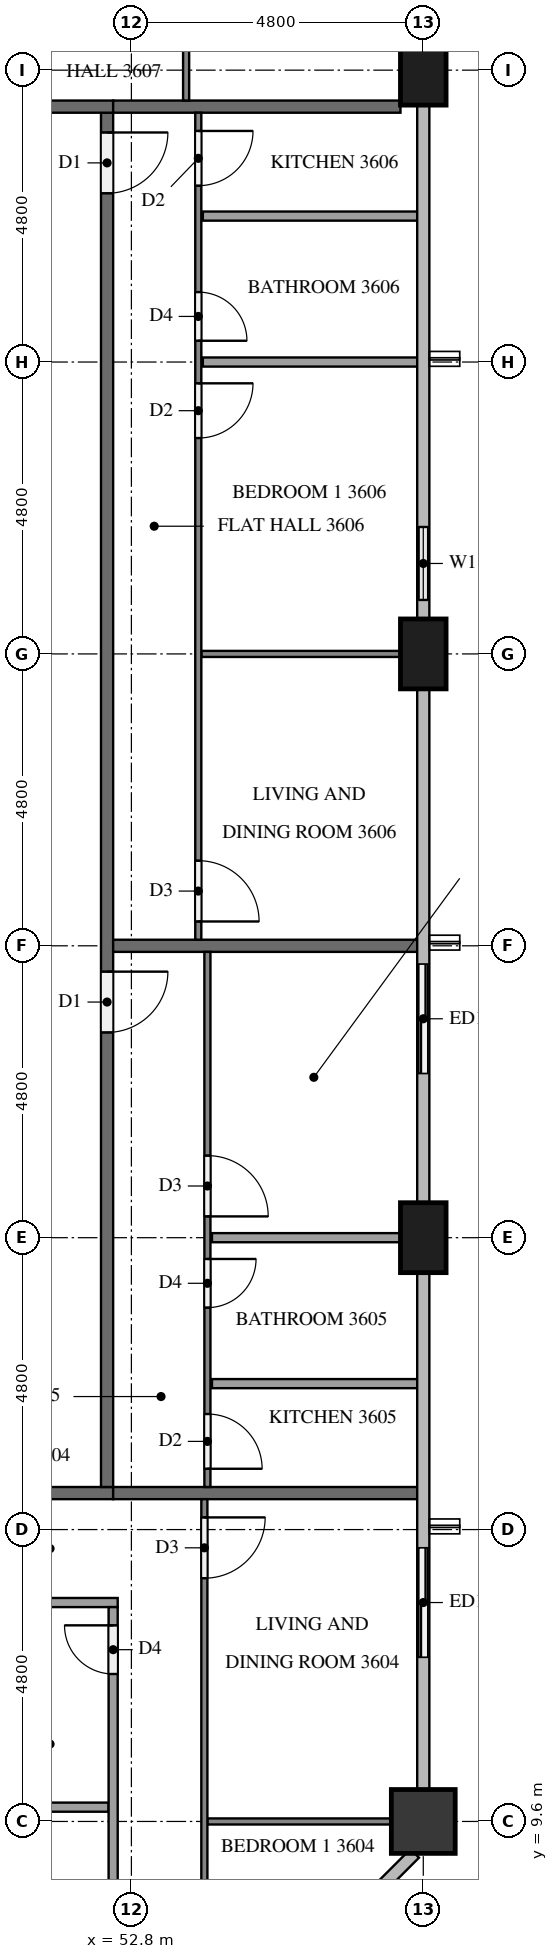
"""IFC4 building model, lengths in metres.
Left out: names, types, materials, properties, quantities, classifications, styles, units other than length and angle.
Written with IfcOpenShell. Run it as: python <this file> out.ifc"""

import sys

from ifc_helpers import new_model, si_unit, direction, frame, frame_2d, origin, origin_2d, place, context, subcontext, project, spatial, rectangle, extrude, element, fill, save


model = new_model("IFC4")
c1 = context("Model", 3, precision=1e-05, world=origin(), true_north=direction((0.0, 1.0)))
c2 = subcontext(c1, "Body", "Model", "MODEL_VIEW")
j1 = project(units=[si_unit("LENGTHUNIT", "METRE"), si_unit("PLANEANGLEUNIT", "RADIAN")], contexts=[c1])
p1 = place(None, origin())
s1 = spatial("IfcSite", under=j1, at=p1, CompositionType="ELEMENT")
p2 = place(p1, origin())
s2 = spatial("IfcBuilding", under=s1, at=p2, CompositionType="ELEMENT")
p3 = place(p2, frame((0.0, 0.0, 140.1)))
s3 = spatial("IfcBuildingStorey", under=s2, at=p3, CompositionType="ELEMENT", Elevation=140.1)
p4 = place(p3, frame((57.6, 9.6, 0.0), z_axis=(0.0, 0.0, 1.0), x_axis=(1.0, 0.0, 0.0)))
e1 = element("IfcColumn", 1, at=p4, inside=s3, PredefinedType="COLUMN", context=c2, shape_type="SweptSolid", body=[
    extrude(rectangle(XDim=1.05, YDim=1.05, at=origin_2d()), origin(), (0.0, 0.0, 1.0), 3.1),
])
for number, where, z_axis, x_axis in (
    (2, (57.6, 19.2, 0.0), (0.0, 0.0, 1.0), (0.0, 1.0, 0.0)),
    (3, (57.6, 28.8, 0.0), (0.0, 0.0, 1.0), (0.0, 1.0, 0.0)),
    (4, (57.6, 38.4, 0.0), (0.0, 0.0, 1.0), (0.0, 1.0, 0.0)),
):
    element("IfcColumn", number, at=place(p3, frame(where, z_axis=z_axis, x_axis=x_axis)), inside=s3, PredefinedType="COLUMN", context=c2, shape_type="SweptSolid", body=[
        extrude(rectangle(XDim=1.15, YDim=0.75, at=origin_2d()), origin(), (0.0, 0.0, 1.0), 3.1),
    ])
p5 = place(p3, frame((57.6, 12.0, 0.0), z_axis=(0.0, 0.0, 1.0), x_axis=(0.0, 1.0, 0.0)))
e5 = element("IfcWall", 5, at=p5, inside=s3, PredefinedType="SOLIDWALL", context=c2, shape_type="SweptSolid", body=[
    extrude(rectangle(XDim=2.4, YDim=0.15, at=frame_2d((1.2, 0.0))), origin(), (0.0, 0.0, 1.0), 3.1),
])
p6 = place(p5, frame((0.3, 0.0, 0.0)))
e6 = element("IfcOpeningElement", 6, at=p6, cuts=e5, PredefinedType="OPENING", context=c2, shape_type="SweptSolid", body=[
    extrude(rectangle(XDim=1.8, YDim=2.4, at=frame_2d((0.9, 1.2))), frame((0.0, 0.085, 0.0), z_axis=(0.0, -1.0, 0.0), x_axis=(1.0, 0.0, 0.0)), (0.0, 0.0, 1.0), 0.17),
])
p7 = place(p3, frame((57.6, 21.6, 0.0), z_axis=(0.0, 0.0, 1.0), x_axis=(0.0, 1.0, 0.0)))
e7 = element("IfcWall", 7, at=p7, inside=s3, PredefinedType="SOLIDWALL", context=c2, shape_type="SweptSolid", body=[
    extrude(rectangle(XDim=2.4, YDim=0.15, at=frame_2d((1.2, 0.0))), origin(), (0.0, 0.0, 1.0), 3.1),
])
p8 = place(p7, frame((0.3, 0.0, 0.0)))
e8 = element("IfcOpeningElement", 8, at=p8, cuts=e7, PredefinedType="OPENING", context=c2, shape_type="SweptSolid", body=[
    extrude(rectangle(XDim=1.8, YDim=2.4, at=frame_2d((0.9, 1.2))), frame((0.0, 0.085, 0.0), z_axis=(0.0, -1.0, 0.0), x_axis=(1.0, 0.0, 0.0)), (0.0, 0.0, 1.0), 0.17),
])
p9 = place(p3, frame((57.6, 29.375, 0.0), z_axis=(0.0, 0.0, 1.0), x_axis=(0.0, 1.0, 0.0)))
e9 = element("IfcWall", 9, at=p9, inside=s3, PredefinedType="SOLIDWALL", context=c2, shape_type="SweptSolid", body=[
    extrude(rectangle(XDim=1.825, YDim=0.15, at=frame_2d((0.913, 0.0))), origin(), (0.0, 0.0, 1.0), 3.1),
])
p10 = place(p9, frame((0.312, 0.0, 0.9)))
e10 = element("IfcOpeningElement", 10, at=p10, cuts=e9, PredefinedType="OPENING", context=c2, shape_type="SweptSolid", body=[
    extrude(rectangle(XDim=1.2, YDim=1.4, at=frame_2d((0.6, 0.7))), frame((0.0, 0.085, 0.0), z_axis=(0.0, -1.0, 0.0), x_axis=(1.0, 0.0, 0.0)), (0.0, 0.0, 1.0), 0.17),
])
p11 = place(p3, frame((50.3, 15.0, 0.0), z_axis=(0.0, 0.0, 1.0), x_axis=(1.0, 0.0, 0.0)))
e11 = element("IfcWall", 11, at=p11, inside=s3, PredefinedType="PARTITIONING", context=c2, shape_type="SweptSolid", body=[
    extrude(rectangle(XDim=2.2, YDim=0.2, at=frame_2d((1.1, 0.0))), origin(), (0.0, 0.0, 1.0), 3.1),
])
p12 = place(p3, frame((52.4, 37.7, 0.0), z_axis=(0.0, 0.0, 1.0), x_axis=(0.0, -1.0, 0.0)))
e12 = element("IfcWall", 12, at=p12, inside=s3, PredefinedType="PARTITIONING", context=c2, shape_type="SweptSolid", body=[
    extrude(rectangle(XDim=22.6, YDim=0.2, at=frame_2d((11.3, 0.0))), origin(), (0.0, 0.0, 1.0), 3.1),
])
p13 = place(p12, frame((14.125, 0.0, 0.0)))
e13 = element("IfcOpeningElement", 13, at=p13, cuts=e12, PredefinedType="OPENING", context=c2, shape_type="SweptSolid", body=[
    extrude(rectangle(XDim=1.0, YDim=2.1, at=frame_2d((0.5, 1.05))), frame((0.0, 0.11, 0.0), z_axis=(0.0, -1.0, 0.0), x_axis=(1.0, 0.0, 0.0)), (0.0, 0.0, 1.0), 0.22),
])
p14 = place(p12, frame((0.325, 0.0, 0.0)))
e14 = element("IfcOpeningElement", 14, at=p14, cuts=e12, PredefinedType="OPENING", context=c2, shape_type="SweptSolid", body=[
    extrude(rectangle(XDim=1.0, YDim=2.1, at=frame_2d((0.5, 1.05))), frame((0.0, 0.11, 0.0), z_axis=(0.0, -1.0, 0.0), x_axis=(1.0, 0.0, 0.0)), (0.0, 0.0, 1.0), 0.22),
])
p15 = place(p3, frame((52.5, 37.8, 0.0), z_axis=(0.0, 0.0, 1.0), x_axis=(-1.0, 0.0, 0.0)))
e15 = element("IfcWall", 15, at=p15, inside=s3, PredefinedType="PARTITIONING", context=c2, shape_type="SweptSolid", body=[
    extrude(rectangle(XDim=2.2, YDim=0.2, at=frame_2d((1.1, 0.0))), origin(), (0.0, 0.0, 1.0), 3.1),
])
for number, where, z_axis, x_axis in (
    (16, (52.5, 15.0, 0.0), (0.0, 0.0, 1.0), (1.0, 0.0, 0.0)),
    (17, (52.5, 24.0, 0.0), (0.0, 0.0, 1.0), (1.0, 0.0, 0.0)),
):
    element("IfcWall", number, at=place(p3, frame(where, z_axis=z_axis, x_axis=x_axis)), inside=s3, PredefinedType="PARTITIONING", context=c2, shape_type="SweptSolid", body=[
        extrude(rectangle(XDim=5.0, YDim=0.2, at=frame_2d((2.5, 0.0))), origin(), (0.0, 0.0, 1.0), 3.1),
    ])
p16 = place(p3, frame((52.5, 37.8, 0.0), z_axis=(0.0, 0.0, 1.0), x_axis=(1.0, 0.0, 0.0)))
e18 = element("IfcWall", 18, at=p16, inside=s3, PredefinedType="PARTITIONING", context=c2, shape_type="SweptSolid", body=[
    extrude(rectangle(XDim=4.725, YDim=0.2, at=frame_2d((2.363, 0.0))), origin(), (0.0, 0.0, 1.0), 3.1),
])
p17 = place(p3, frame((54.05, 9.6, 0.0), z_axis=(0.0, 0.0, 1.0), x_axis=(1.0, 0.0, 0.0)))
e19 = element("IfcWall", 19, at=p17, inside=s3, PredefinedType="PARTITIONING", context=c2, shape_type="SweptSolid", body=[
    extrude(rectangle(XDim=3.025, YDim=0.1, at=frame_2d((1.512, 0.0))), origin(), (0.0, 0.0, 1.0), 3.1),
])
p18 = place(p3, frame((54.0, 14.9, 0.0), z_axis=(0.0, 0.0, 1.0), x_axis=(0.0, -1.0, 0.0)))
e20 = element("IfcWall", 20, at=p18, inside=s3, PredefinedType="PARTITIONING", context=c2, shape_type="SweptSolid", body=[
    extrude(rectangle(XDim=9.678, YDim=0.1, at=frame_2d((4.839, 0.0))), origin(), (0.0, 0.0, 1.0), 3.1),
])
p19 = place(p18, frame((0.3, 0.0, 0.0)))
e21 = element("IfcOpeningElement", 21, at=p19, cuts=e20, PredefinedType="OPENING", context=c2, shape_type="SweptSolid", body=[
    extrude(rectangle(XDim=1.0, YDim=2.1, at=frame_2d((0.5, 1.05))), frame((0.0, 0.06, 0.0), z_axis=(0.0, -1.0, 0.0), x_axis=(1.0, 0.0, 0.0)), (0.0, 0.0, 1.0), 0.12),
])
p20 = place(p18, frame((8.479, 0.0, 0.0)))
e22 = element("IfcOpeningElement", 22, at=p20, cuts=e20, PredefinedType="OPENING", context=c2, shape_type="SweptSolid", body=[
    extrude(rectangle(XDim=0.9, YDim=2.1, at=frame_2d((0.45, 1.05))), frame((0.0, 0.06, 0.0), z_axis=(0.0, -1.0, 0.0), x_axis=(1.0, 0.0, 0.0)), (0.0, 0.0, 1.0), 0.12),
])
p21 = place(p3, frame((50.5, 9.835, 0.0), z_axis=(0.0, 0.0, 1.0), x_axis=(1.0, 0.0, 0.0)))
e23 = element("IfcWall", 23, at=p21, inside=s3, PredefinedType="PARTITIONING", context=c2, shape_type="SweptSolid", body=[
    extrude(rectangle(XDim=1.925, YDim=0.15, at=frame_2d((0.962, 0.0))), origin(), (0.0, 0.0, 1.0), 3.1),
])
p22 = place(p3, frame((50.5, 13.2, 0.0), z_axis=(0.0, 0.0, 1.0), x_axis=(1.0, 0.0, 0.0)))
e24 = element("IfcWall", 24, at=p22, inside=s3, PredefinedType="PARTITIONING", context=c2, shape_type="SweptSolid", body=[
    extrude(rectangle(XDim=2.075, YDim=0.15, at=frame_2d((1.038, 0.0))), origin(), (0.0, 0.0, 1.0), 3.1),
])
p23 = place(p3, frame((52.5, 5.325, 0.0), z_axis=(0.0, 0.0, 1.0), x_axis=(0.0, 1.0, 0.0)))
e25 = element("IfcWall", 25, at=p23, inside=s3, PredefinedType="PARTITIONING", context=c2, shape_type="SweptSolid", body=[
    extrude(rectangle(XDim=7.8, YDim=0.15, at=frame_2d((3.9, 0.0))), origin(), (0.0, 0.0, 1.0), 3.1),
])
p24 = place(p23, frame((6.7, 0.0, 0.0)))
e26 = element("IfcOpeningElement", 26, at=p24, cuts=e25, PredefinedType="OPENING", context=c2, shape_type="SweptSolid", body=[
    extrude(rectangle(XDim=0.8, YDim=2.1, at=frame_2d((0.4, 1.05))), frame((0.0, 0.085, 0.0), z_axis=(0.0, -1.0, 0.0), x_axis=(1.0, 0.0, 0.0)), (0.0, 0.0, 1.0), 0.17),
])
p25 = place(p23, frame((0.3, 0.0, 0.0)))
e27 = element("IfcOpeningElement", 27, at=p25, cuts=e25, PredefinedType="OPENING", context=c2, shape_type="SweptSolid", body=[
    extrude(rectangle(XDim=0.9, YDim=2.1, at=frame_2d((0.45, 1.05))), frame((0.0, 0.085, 0.0), z_axis=(0.0, -1.0, 0.0), x_axis=(1.0, 0.0, 0.0)), (0.0, 0.0, 1.0), 0.17),
])
p26 = place(p3, frame((54.125, 19.2, 0.0), z_axis=(0.0, 0.0, 1.0), x_axis=(1.0, 0.0, 0.0)))
e28 = element("IfcWall", 28, at=p26, inside=s3, PredefinedType="PARTITIONING", context=c2, shape_type="SweptSolid", body=[
    extrude(rectangle(XDim=3.1, YDim=0.15, at=frame_2d((1.55, 0.0))), origin(), (0.0, 0.0, 1.0), 3.1),
])
p27 = place(p3, frame((54.125, 16.8, 0.0), z_axis=(0.0, 0.0, 1.0), x_axis=(1.0, 0.0, 0.0)))
e29 = element("IfcWall", 29, at=p27, inside=s3, PredefinedType="PARTITIONING", context=c2, shape_type="SweptSolid", body=[
    extrude(rectangle(XDim=3.375, YDim=0.15, at=frame_2d((1.688, 0.0))), origin(), (0.0, 0.0, 1.0), 3.1),
])
p28 = place(p3, frame((54.05, 23.9, 0.0), z_axis=(0.0, 0.0, 1.0), x_axis=(0.0, -1.0, 0.0)))
e30 = element("IfcWall", 30, at=p28, inside=s3, PredefinedType="PARTITIONING", context=c2, shape_type="SweptSolid", body=[
    extrude(rectangle(XDim=8.8, YDim=0.1, at=frame_2d((4.4, 0.0))), origin(), (0.0, 0.0, 1.0), 3.1),
])
p29 = place(p28, frame((3.35, 0.0, 0.0)))
e31 = element("IfcOpeningElement", 31, at=p29, cuts=e30, PredefinedType="OPENING", context=c2, shape_type="SweptSolid", body=[
    extrude(rectangle(XDim=1.0, YDim=2.1, at=frame_2d((0.5, 1.05))), frame((0.0, 0.06, 0.0), z_axis=(0.0, -1.0, 0.0), x_axis=(1.0, 0.0, 0.0)), (0.0, 0.0, 1.0), 0.12),
])
p30 = place(p28, frame((5.05, 0.0, 0.0)))
e32 = element("IfcOpeningElement", 32, at=p30, cuts=e30, PredefinedType="OPENING", context=c2, shape_type="SweptSolid", body=[
    extrude(rectangle(XDim=0.8, YDim=2.1, at=frame_2d((0.4, 1.05))), frame((0.0, 0.06, 0.0), z_axis=(0.0, -1.0, 0.0), x_axis=(1.0, 0.0, 0.0)), (0.0, 0.0, 1.0), 0.12),
])
p31 = place(p28, frame((7.6, 0.0, 0.0)))
e33 = element("IfcOpeningElement", 33, at=p31, cuts=e30, PredefinedType="OPENING", context=c2, shape_type="SweptSolid", body=[
    extrude(rectangle(XDim=0.9, YDim=2.1, at=frame_2d((0.45, 1.05))), frame((0.0, 0.06, 0.0), z_axis=(0.0, -1.0, 0.0), x_axis=(1.0, 0.0, 0.0)), (0.0, 0.0, 1.0), 0.12),
])
for number, where, z_axis, x_axis in (
    (34, (53.975, 36.0, 0.0), (0.0, 0.0, 1.0), (1.0, 0.0, 0.0)),
    (35, (53.975, 33.6, 0.0), (0.0, 0.0, 1.0), (1.0, 0.0, 0.0)),
):
    element("IfcWall", number, at=place(p3, frame(where, z_axis=z_axis, x_axis=x_axis)), inside=s3, PredefinedType="PARTITIONING", context=c2, shape_type="SweptSolid", body=[
        extrude(rectangle(XDim=3.525, YDim=0.15, at=frame_2d((1.762, 0.0))), origin(), (0.0, 0.0, 1.0), 3.1),
    ])
p32 = place(p3, frame((53.95, 28.8, 0.0), z_axis=(0.0, 0.0, 1.0), x_axis=(1.0, 0.0, 0.0)))
e36 = element("IfcWall", 36, at=p32, inside=s3, PredefinedType="PARTITIONING", context=c2, shape_type="SweptSolid", body=[
    extrude(rectangle(XDim=3.275, YDim=0.1, at=frame_2d((1.638, 0.0))), origin(), (0.0, 0.0, 1.0), 3.1),
])
p33 = place(p3, frame((53.9, 37.7, 0.0), z_axis=(0.0, 0.0, 1.0), x_axis=(0.0, -1.0, 0.0)))
e37 = element("IfcWall", 37, at=p33, inside=s3, PredefinedType="PARTITIONING", context=c2, shape_type="SweptSolid", body=[
    extrude(rectangle(XDim=13.6, YDim=0.1, at=frame_2d((6.8, 0.0))), origin(), (0.0, 0.0, 1.0), 3.1),
])
p34 = place(p33, frame((0.3, 0.0, 0.0)))
e38 = element("IfcOpeningElement", 38, at=p34, cuts=e37, PredefinedType="OPENING", context=c2, shape_type="SweptSolid", body=[
    extrude(rectangle(XDim=0.9, YDim=2.1, at=frame_2d((0.45, 1.05))), frame((0.0, 0.06, 0.0), z_axis=(0.0, -1.0, 0.0), x_axis=(1.0, 0.0, 0.0)), (0.0, 0.0, 1.0), 0.12),
])
p35 = place(p33, frame((2.95, 0.0, 0.0)))
e39 = element("IfcOpeningElement", 39, at=p35, cuts=e37, PredefinedType="OPENING", context=c2, shape_type="SweptSolid", body=[
    extrude(rectangle(XDim=0.8, YDim=2.1, at=frame_2d((0.4, 1.05))), frame((0.0, 0.06, 0.0), z_axis=(0.0, -1.0, 0.0), x_axis=(1.0, 0.0, 0.0)), (0.0, 0.0, 1.0), 0.12),
])
p36 = place(p33, frame((4.45, 0.0, 0.0)))
e40 = element("IfcOpeningElement", 40, at=p36, cuts=e37, PredefinedType="OPENING", context=c2, shape_type="SweptSolid", body=[
    extrude(rectangle(XDim=0.9, YDim=2.1, at=frame_2d((0.45, 1.05))), frame((0.0, 0.06, 0.0), z_axis=(0.0, -1.0, 0.0), x_axis=(1.0, 0.0, 0.0)), (0.0, 0.0, 1.0), 0.12),
])
p37 = place(p33, frame((12.3, 0.0, 0.0)))
e41 = element("IfcOpeningElement", 41, at=p37, cuts=e37, PredefinedType="OPENING", context=c2, shape_type="SweptSolid", body=[
    extrude(rectangle(XDim=1.0, YDim=2.1, at=frame_2d((0.5, 1.05))), frame((0.0, 0.06, 0.0), z_axis=(0.0, -1.0, 0.0), x_axis=(1.0, 0.0, 0.0)), (0.0, 0.0, 1.0), 0.12),
])
p38 = place(p3, frame((53.7, 52.459, 0.0), z_axis=(0.0, 0.0, 1.0), x_axis=(0.0, -1.0, 0.0)))
e42 = element("IfcWall", 42, at=p38, inside=s3, PredefinedType="PARTITIONING", context=c2, shape_type="SweptSolid", body=[
    extrude(rectangle(XDim=14.559, YDim=0.1, at=frame_2d((7.279, 0.0))), origin(), (0.0, 0.0, 1.0), 3.1),
])
p39 = place(p38, frame((9.609, 0.0, 0.0)))
e43 = element("IfcOpeningElement", 43, at=p39, cuts=e42, PredefinedType="OPENING", context=c2, shape_type="SweptSolid", body=[
    extrude(rectangle(XDim=0.9, YDim=2.1, at=frame_2d((0.45, 1.05))), frame((0.0, 0.06, 0.0), z_axis=(0.0, -1.0, 0.0), x_axis=(1.0, 0.0, 0.0)), (0.0, 0.0, 1.0), 0.12),
])
p40 = place(p38, frame((7.909, 0.0, 0.0)))
e44 = element("IfcOpeningElement", 44, at=p40, cuts=e42, PredefinedType="OPENING", context=c2, shape_type="SweptSolid", body=[
    extrude(rectangle(XDim=1.0, YDim=2.1, at=frame_2d((0.5, 1.05))), frame((0.0, 0.06, 0.0), z_axis=(0.0, -1.0, 0.0), x_axis=(1.0, 0.0, 0.0)), (0.0, 0.0, 1.0), 0.12),
])
p41 = place(p38, frame((0.3, 0.0, 0.0)))
e45 = element("IfcOpeningElement", 45, at=p41, cuts=e42, PredefinedType="OPENING", context=c2, shape_type="SweptSolid", body=[
    extrude(rectangle(XDim=0.9, YDim=2.1, at=frame_2d((0.45, 1.05))), frame((0.0, 0.06, 0.0), z_axis=(0.0, -1.0, 0.0), x_axis=(1.0, 0.0, 0.0)), (0.0, 0.0, 1.0), 0.12),
])
p42 = place(p6, origin())
e46 = element("IfcDoor", 46, at=p42, inside=s3, OperationType="SLIDING_TO_RIGHT", PredefinedType="DOOR", context=c2, shape_type="SweptSolid", body=[
    extrude(rectangle(XDim=1.8, YDim=2.4, at=frame_2d((0.9, 1.2))), frame((0.0, 0.025, 0.0), z_axis=(0.0, -1.0, 0.0), x_axis=(1.0, 0.0, 0.0)), (0.0, 0.0, 1.0), 0.05),
])
fill(e6, e46)
p43 = place(p8, origin())
e47 = element("IfcDoor", 47, at=p43, inside=s3, OperationType="SLIDING_TO_LEFT", PredefinedType="DOOR", context=c2, shape_type="SweptSolid", body=[
    extrude(rectangle(XDim=1.8, YDim=2.4, at=frame_2d((0.9, 1.2))), frame((0.0, 0.025, 0.0), z_axis=(0.0, -1.0, 0.0), x_axis=(1.0, 0.0, 0.0)), (0.0, 0.0, 1.0), 0.05),
])
fill(e8, e47)
p44 = place(p10, origin())
e48 = element("IfcWindow", 48, at=p44, inside=s3, PartitioningType="SINGLE_PANEL", PredefinedType="WINDOW", context=c2, shape_type="SweptSolid", body=[
    extrude(rectangle(XDim=1.2, YDim=1.4, at=frame_2d((0.6, 0.7))), frame((0.0, 0.03, 0.0), z_axis=(0.0, -1.0, 0.0), x_axis=(1.0, 0.0, 0.0)), (0.0, 0.0, 1.0), 0.06),
])
fill(e10, e48)
p45 = place(p13, origin())
e49 = element("IfcDoor", 49, at=p45, inside=s3, OperationType="SINGLE_SWING_LEFT", PredefinedType="DOOR", context=c2, shape_type="SweptSolid", body=[
    extrude(rectangle(XDim=1.0, YDim=2.1, at=frame_2d((0.5, 1.05))), frame((0.0, 0.025, 0.0), z_axis=(0.0, -1.0, 0.0), x_axis=(1.0, 0.0, 0.0)), (0.0, 0.0, 1.0), 0.05),
])
fill(e13, e49)
p46 = place(p14, origin())
e50 = element("IfcDoor", 50, at=p46, inside=s3, OperationType="SINGLE_SWING_LEFT", PredefinedType="DOOR", context=c2, shape_type="SweptSolid", body=[
    extrude(rectangle(XDim=1.0, YDim=2.1, at=frame_2d((0.5, 1.05))), frame((0.0, 0.025, 0.0), z_axis=(0.0, -1.0, 0.0), x_axis=(1.0, 0.0, 0.0)), (0.0, 0.0, 1.0), 0.05),
])
fill(e14, e50)
p47 = place(p19, origin())
e51 = element("IfcDoor", 51, at=p47, inside=s3, OperationType="SINGLE_SWING_LEFT", PredefinedType="DOOR", context=c2, shape_type="SweptSolid", body=[
    extrude(rectangle(XDim=1.0, YDim=2.1, at=frame_2d((0.5, 1.05))), frame((0.0, 0.025, 0.0), z_axis=(0.0, -1.0, 0.0), x_axis=(1.0, 0.0, 0.0)), (0.0, 0.0, 1.0), 0.05),
])
fill(e21, e51)
p48 = place(p24, origin())
e52 = element("IfcDoor", 52, at=p48, inside=s3, OperationType="SINGLE_SWING_RIGHT", PredefinedType="DOOR", context=c2, shape_type="SweptSolid", body=[
    extrude(rectangle(XDim=0.8, YDim=2.1, at=frame_2d((0.4, 1.05))), frame((0.0, 0.025, 0.0), z_axis=(0.0, -1.0, 0.0), x_axis=(1.0, 0.0, 0.0)), (0.0, 0.0, 1.0), 0.05),
])
fill(e26, e52)
p49 = place(p29, origin())
e53 = element("IfcDoor", 53, at=p49, inside=s3, OperationType="SINGLE_SWING_RIGHT", PredefinedType="DOOR", context=c2, shape_type="SweptSolid", body=[
    extrude(rectangle(XDim=1.0, YDim=2.1, at=frame_2d((0.5, 1.05))), frame((0.0, 0.025, 0.0), z_axis=(0.0, -1.0, 0.0), x_axis=(1.0, 0.0, 0.0)), (0.0, 0.0, 1.0), 0.05),
])
fill(e31, e53)
p50 = place(p30, origin())
e54 = element("IfcDoor", 54, at=p50, inside=s3, OperationType="SINGLE_SWING_LEFT", PredefinedType="DOOR", context=c2, shape_type="SweptSolid", body=[
    extrude(rectangle(XDim=0.8, YDim=2.1, at=frame_2d((0.4, 1.05))), frame((0.0, 0.025, 0.0), z_axis=(0.0, -1.0, 0.0), x_axis=(1.0, 0.0, 0.0)), (0.0, 0.0, 1.0), 0.05),
])
fill(e32, e54)
p51 = place(p31, origin())
e55 = element("IfcDoor", 55, at=p51, inside=s3, OperationType="SINGLE_SWING_RIGHT", PredefinedType="DOOR", context=c2, shape_type="SweptSolid", body=[
    extrude(rectangle(XDim=0.9, YDim=2.1, at=frame_2d((0.45, 1.05))), frame((0.0, 0.025, 0.0), z_axis=(0.0, -1.0, 0.0), x_axis=(1.0, 0.0, 0.0)), (0.0, 0.0, 1.0), 0.05),
])
fill(e33, e55)
p52 = place(p34, origin())
e56 = element("IfcDoor", 56, at=p52, inside=s3, OperationType="SINGLE_SWING_LEFT", PredefinedType="DOOR", context=c2, shape_type="SweptSolid", body=[
    extrude(rectangle(XDim=0.9, YDim=2.1, at=frame_2d((0.45, 1.05))), frame((0.0, 0.025, 0.0), z_axis=(0.0, -1.0, 0.0), x_axis=(1.0, 0.0, 0.0)), (0.0, 0.0, 1.0), 0.05),
])
fill(e38, e56)
p53 = place(p35, origin())
e57 = element("IfcDoor", 57, at=p53, inside=s3, OperationType="SINGLE_SWING_RIGHT", PredefinedType="DOOR", context=c2, shape_type="SweptSolid", body=[
    extrude(rectangle(XDim=0.8, YDim=2.1, at=frame_2d((0.4, 1.05))), frame((0.0, 0.025, 0.0), z_axis=(0.0, -1.0, 0.0), x_axis=(1.0, 0.0, 0.0)), (0.0, 0.0, 1.0), 0.05),
])
fill(e39, e57)
p54 = place(p36, origin())
e58 = element("IfcDoor", 58, at=p54, inside=s3, OperationType="SINGLE_SWING_LEFT", PredefinedType="DOOR", context=c2, shape_type="SweptSolid", body=[
    extrude(rectangle(XDim=0.9, YDim=2.1, at=frame_2d((0.45, 1.05))), frame((0.0, 0.025, 0.0), z_axis=(0.0, -1.0, 0.0), x_axis=(1.0, 0.0, 0.0)), (0.0, 0.0, 1.0), 0.05),
])
fill(e40, e58)
p55 = place(p37, origin())
e59 = element("IfcDoor", 59, at=p55, inside=s3, OperationType="SINGLE_SWING_RIGHT", PredefinedType="DOOR", context=c2, shape_type="SweptSolid", body=[
    extrude(rectangle(XDim=1.0, YDim=2.1, at=frame_2d((0.5, 1.05))), frame((0.0, 0.025, 0.0), z_axis=(0.0, -1.0, 0.0), x_axis=(1.0, 0.0, 0.0)), (0.0, 0.0, 1.0), 0.05),
])
fill(e41, e59)
save(model, sys.argv[1])
